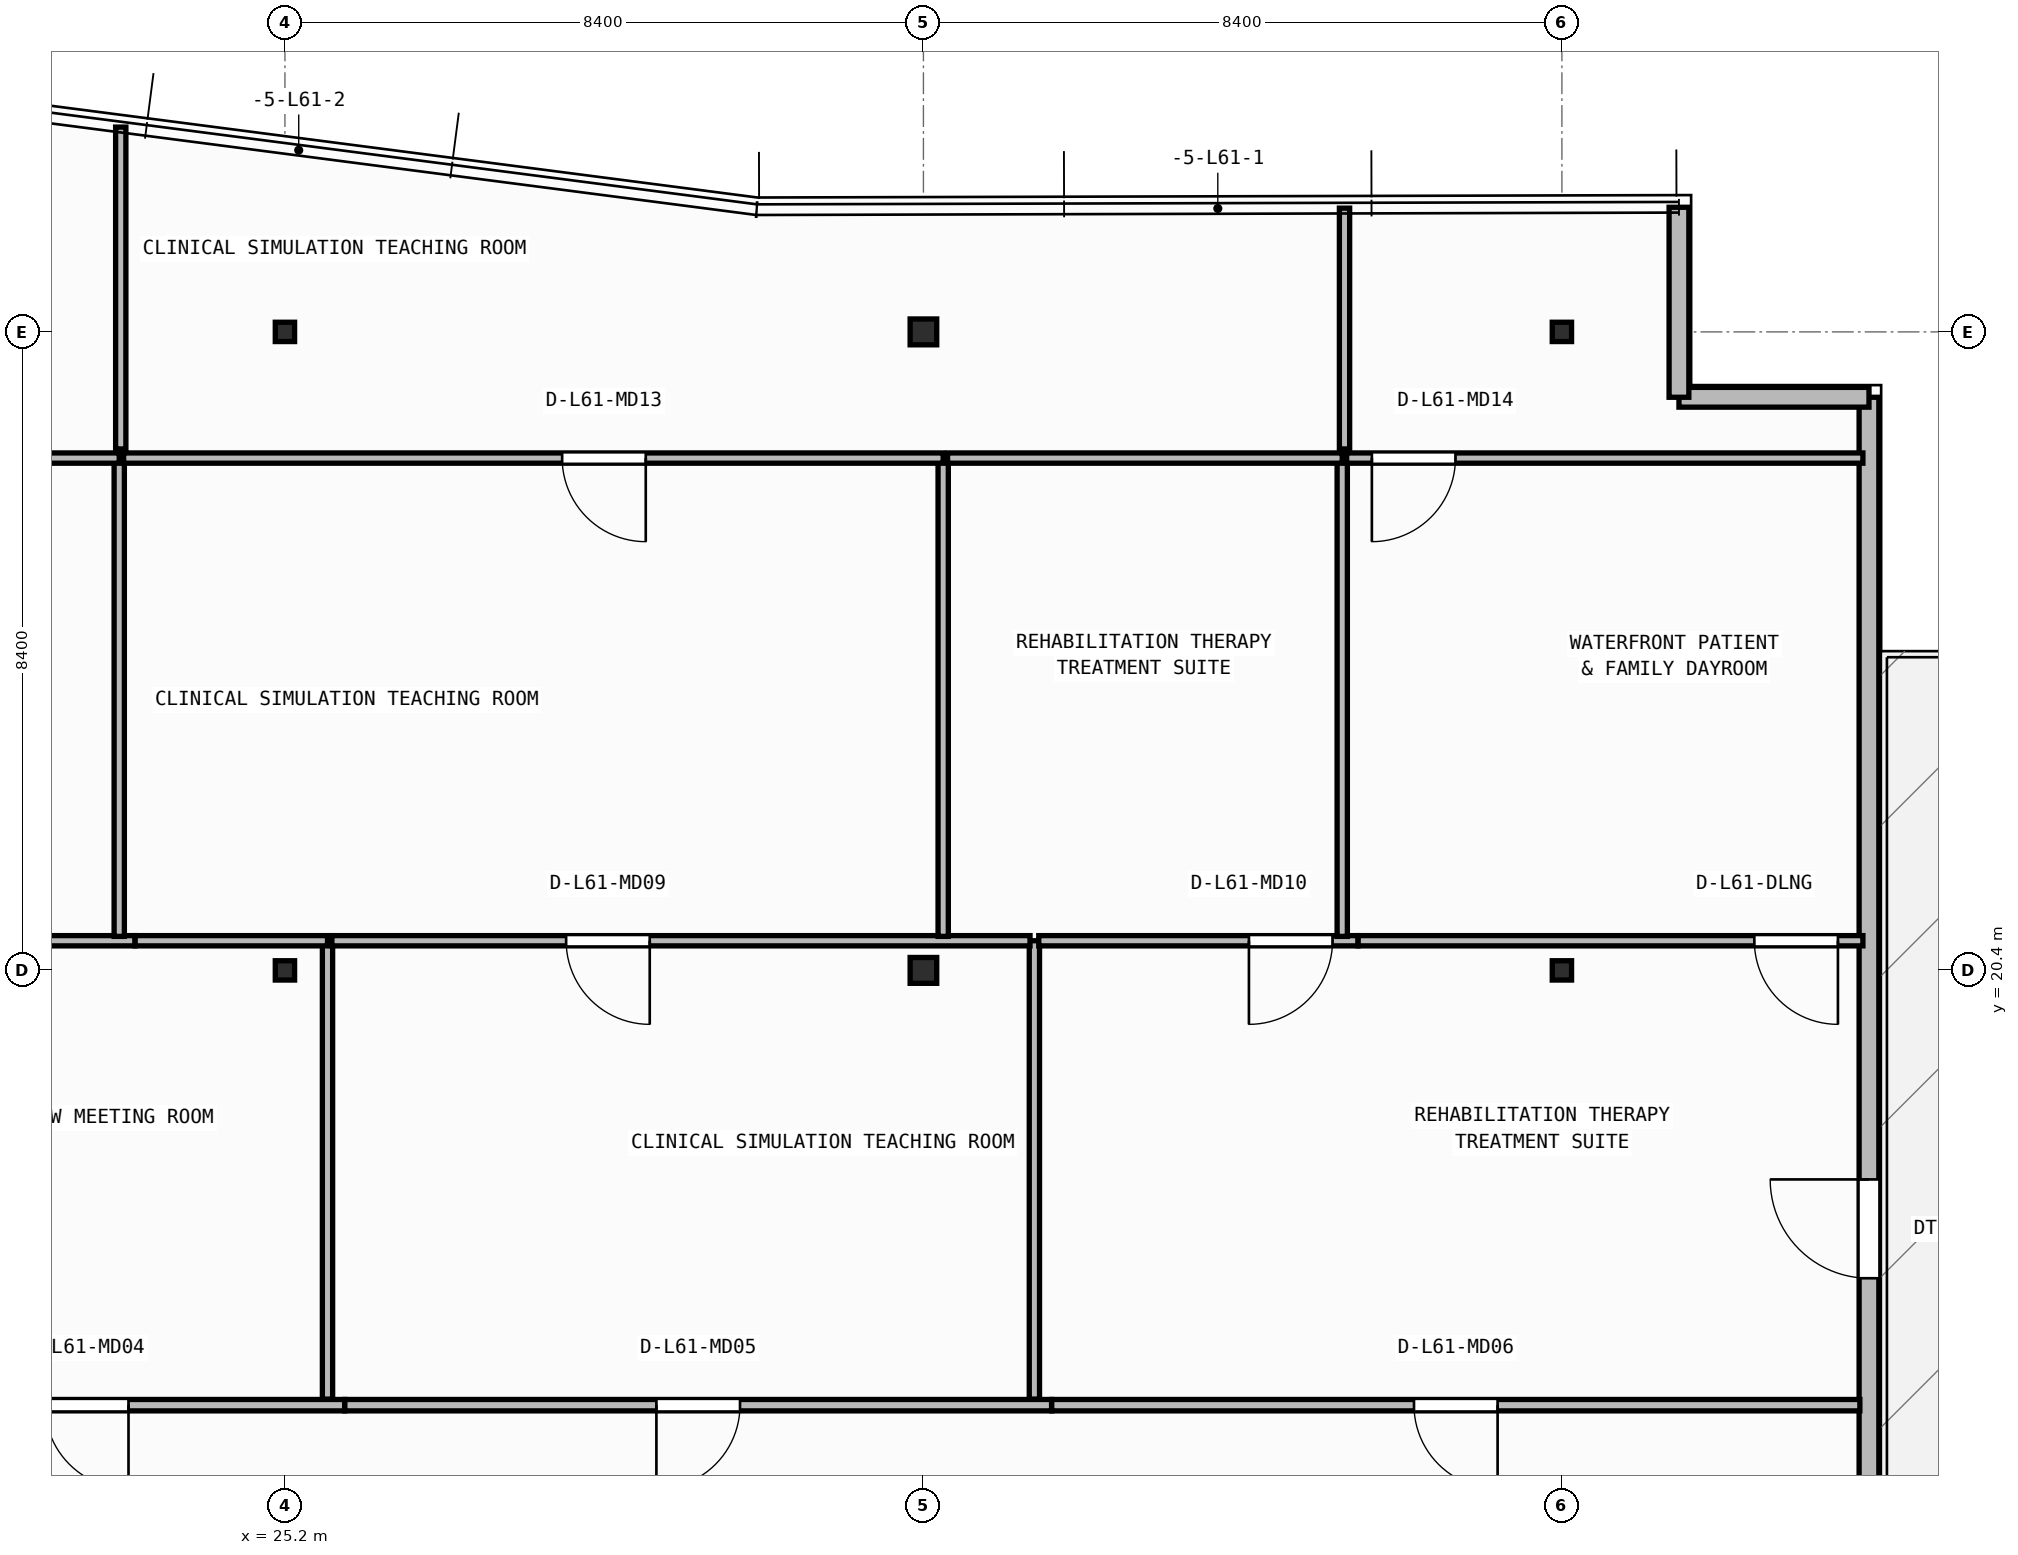
"""IFC4 building model, lengths in metres.
Left out: names, types, materials, properties, quantities, classifications, styles, units other than length and angle.
Written with IfcOpenShell. Run it as: python <this file> out.ifc"""

import sys

from ifc_helpers import new_model, si_unit, direction, frame, frame_2d, origin, origin_2d, place, context, subcontext, project, spatial, rectangle, i_section, extrude, element, fill, save


model = new_model("IFC4")
c1 = context("Model", 3, precision=1e-05, world=origin(), true_north=direction((0.0, 1.0)))
c2 = subcontext(c1, "Body", "Model", "MODEL_VIEW")
j1 = project(units=[si_unit("LENGTHUNIT", "METRE"), si_unit("PLANEANGLEUNIT", "RADIAN")], contexts=[c1])
p1 = place(None, origin())
s1 = spatial("IfcSite", under=j1, at=p1, CompositionType="ELEMENT")
p2 = place(p1, origin())
s2 = spatial("IfcBuilding", under=s1, at=p2, CompositionType="ELEMENT")
p3 = place(p2, frame((0.0, 0.0, 248.65)))
s3 = spatial("IfcBuildingStorey", under=s2, at=p3, CompositionType="ELEMENT", Elevation=248.65)
p4 = place(p3, frame((25.2, 20.4, 0.0), z_axis=(0.0, 0.0, 1.0), x_axis=(1.0, 0.0, 0.0)))
e1 = element("IfcColumn", 1, at=p4, inside=s3, PredefinedType="COLUMN", context=c2, shape_type="SweptSolid", body=[
    extrude(i_section(OverallWidth=0.254, OverallDepth=0.254, WebThickness=0.009, FlangeThickness=0.014, FilletRadius=0.013, at=origin_2d()), origin(), (0.0, 0.0, 1.0), 3.95),
])
p5 = place(p3, frame((33.6, 20.4, 0.0), z_axis=(0.0, 0.0, 1.0), x_axis=(1.0, 0.0, 0.0)))
e2 = element("IfcColumn", 2, at=p5, inside=s3, PredefinedType="COLUMN", context=c2, shape_type="SweptSolid", body=[
    extrude(i_section(OverallWidth=0.35, OverallDepth=0.34, WebThickness=0.016, FlangeThickness=0.028, at=origin_2d()), origin(), (0.0, 0.0, 1.0), 3.95),
])
for number, where, z_axis, x_axis in (
    (3, (42.0, 20.4, 0.0), (0.0, 0.0, 1.0), (1.0, 0.0, 0.0)),
    (4, (25.2, 28.8, 0.0), (0.0, 0.0, 1.0), (1.0, 0.0, 0.0)),
):
    element("IfcColumn", number, at=place(p3, frame(where, z_axis=z_axis, x_axis=x_axis)), inside=s3, PredefinedType="COLUMN", context=c2, shape_type="SweptSolid", body=[
        extrude(i_section(OverallWidth=0.254, OverallDepth=0.254, WebThickness=0.009, FlangeThickness=0.014, FilletRadius=0.013, at=origin_2d()), origin(), (0.0, 0.0, 1.0), 3.95),
    ])
p6 = place(p3, frame((33.6, 28.8, 0.0), z_axis=(0.0, 0.0, 1.0), x_axis=(1.0, 0.0, 0.0)))
e5 = element("IfcColumn", 5, at=p6, inside=s3, PredefinedType="COLUMN", context=c2, shape_type="SweptSolid", body=[
    extrude(i_section(OverallWidth=0.35, OverallDepth=0.34, WebThickness=0.016, FlangeThickness=0.028, at=origin_2d()), origin(), (0.0, 0.0, 1.0), 3.95),
])
p7 = place(p3, frame((42.0, 28.8, 0.0), z_axis=(0.0, 0.0, 1.0), x_axis=(1.0, 0.0, 0.0)))
e6 = element("IfcColumn", 6, at=p7, inside=s3, PredefinedType="COLUMN", context=c2, shape_type="SweptSolid", body=[
    extrude(i_section(OverallWidth=0.254, OverallDepth=0.254, WebThickness=0.009, FlangeThickness=0.014, FilletRadius=0.013, at=origin_2d()), origin(), (0.0, 0.0, 1.0), 3.95),
])
p8 = place(p3, frame((46.04, 6.06, 0.0), z_axis=(0.0, 0.0, 1.0), x_axis=(0.0, 1.0, 0.0)))
e7 = element("IfcWall", 7, at=p8, inside=s3, PredefinedType="STANDARD", context=c2, shape_type="SweptSolid", body=[
    extrude(rectangle(XDim=21.88, YDim=0.26, at=frame_2d((10.94, 0.0))), origin(), (0.0, 0.0, 1.0), 3.71),
])
p9 = place(p8, frame((10.29, 0.0, 0.0)))
e8 = element("IfcOpeningElement", 8, at=p9, cuts=e7, PredefinedType="OPENING", context=c2, shape_type="SweptSolid", body=[
    extrude(rectangle(XDim=1.3, YDim=2.15, at=frame_2d((0.65, 1.075))), frame((0.0, 0.14, 0.0), z_axis=(0.0, -1.0, 0.0), x_axis=(1.0, 0.0, 0.0)), (0.0, 0.0, 1.0), 0.28),
])
p10 = place(p3, frame((46.04, 27.94, 0.0), z_axis=(0.0, 0.0, 1.0), x_axis=(-1.0, 0.0, 0.0)))
e9 = element("IfcWall", 9, at=p10, inside=s3, PredefinedType="STANDARD", context=c2, shape_type="SweptSolid", body=[
    extrude(rectangle(XDim=2.5, YDim=0.26, at=frame_2d((1.25, 0.0))), origin(), (0.0, 0.0, 1.0), 3.71),
])
p11 = place(p3, frame((43.54, 27.94, 0.0), z_axis=(0.0, 0.0, 1.0), x_axis=(0.0, 1.0, 0.0)))
e10 = element("IfcWall", 10, at=p11, inside=s3, PredefinedType="STANDARD", context=c2, shape_type="SweptSolid", body=[
    extrude(rectangle(XDim=2.5, YDim=0.26, at=frame_2d((1.25, 0.0))), origin(), (0.0, 0.0, 1.0), 3.71),
])
p12 = place(p3, frame((25.986, 14.68, 0.0), z_axis=(0.0, 0.0, 1.0), x_axis=(-1.0, 0.0, 0.0)))
e11 = element("IfcWall", 11, at=p12, inside=s3, PredefinedType="PARTITIONING", context=c2, shape_type="SweptSolid", body=[
    extrude(rectangle(XDim=6.788, YDim=0.15, at=frame_2d((3.394, 0.0))), origin(), (0.0, 0.0, 1.0), 3.71),
])
p13 = place(p12, frame((2.844, 0.0, 0.0)))
e12 = element("IfcOpeningElement", 12, at=p13, cuts=e11, PredefinedType="OPENING", context=c2, shape_type="SweptSolid", body=[
    extrude(rectangle(XDim=1.1, YDim=2.1, at=frame_2d((0.55, 1.05))), frame((0.0, 0.085, 0.0), z_axis=(0.0, -1.0, 0.0), x_axis=(1.0, 0.0, 0.0)), (0.0, 0.0, 1.0), 0.17),
])
p14 = place(p3, frame((35.286, 14.68, 0.0), z_axis=(0.0, 0.0, 1.0), x_axis=(-1.0, 0.0, 0.0)))
e13 = element("IfcWall", 13, at=p14, inside=s3, PredefinedType="PARTITIONING", context=c2, shape_type="SweptSolid", body=[
    extrude(rectangle(XDim=9.298, YDim=0.15, at=frame_2d((4.649, 0.0))), origin(), (0.0, 0.0, 1.0), 3.71),
])
p15 = place(p14, frame((4.099, 0.0, 0.0)))
e14 = element("IfcOpeningElement", 14, at=p15, cuts=e13, PredefinedType="OPENING", context=c2, shape_type="SweptSolid", body=[
    extrude(rectangle(XDim=1.1, YDim=2.1, at=frame_2d((0.55, 1.05))), frame((0.0, 0.085, 0.0), z_axis=(0.0, -1.0, 0.0), x_axis=(1.0, 0.0, 0.0)), (0.0, 0.0, 1.0), 0.17),
])
p16 = place(p3, frame((45.92, 14.68, 0.0), z_axis=(0.0, 0.0, 1.0), x_axis=(-1.0, 0.0, 0.0)))
e15 = element("IfcWall", 15, at=p16, inside=s3, PredefinedType="PARTITIONING", context=c2, shape_type="SweptSolid", body=[
    extrude(rectangle(XDim=10.632, YDim=0.15, at=frame_2d((5.316, 0.0))), origin(), (0.0, 0.0, 1.0), 3.71),
])
p17 = place(p16, frame((4.766, 0.0, 0.0)))
e16 = element("IfcOpeningElement", 16, at=p17, cuts=e15, PredefinedType="OPENING", context=c2, shape_type="SweptSolid", body=[
    extrude(rectangle(XDim=1.1, YDim=2.1, at=frame_2d((0.55, 1.05))), frame((0.0, 0.085, 0.0), z_axis=(0.0, -1.0, 0.0), x_axis=(1.0, 0.0, 0.0)), (0.0, 0.0, 1.0), 0.17),
])
p18 = place(p3, frame((25.76, 14.76, 0.0), z_axis=(0.0, 0.0, 1.0), x_axis=(0.0, 1.0, 0.0)))
e17 = element("IfcWall", 17, at=p18, inside=s3, PredefinedType="PARTITIONING", context=c2, shape_type="SweptSolid", body=[
    extrude(rectangle(XDim=6.03, YDim=0.135, at=frame_2d((3.015, 0.0))), origin(), (0.0, 0.0, 1.0), 3.71),
])
p19 = place(p3, frame((23.228, 20.79, 0.0), z_axis=(0.0, 0.0, 1.0), x_axis=(-1.0, 0.0, 0.0)))
e18 = element("IfcWall", 18, at=p19, inside=s3, PredefinedType="PARTITIONING", context=c2, shape_type="SweptSolid", body=[
    extrude(rectangle(XDim=4.2, YDim=0.135, at=frame_2d((2.1, 0.0))), origin(), (0.0, 0.0, 1.0), 3.157),
])
p20 = place(p3, frame((25.76, 20.79, 0.0), z_axis=(0.0, 0.0, 1.0), x_axis=(-1.0, 0.0, 0.0)))
e19 = element("IfcWall", 19, at=p20, inside=s3, PredefinedType="PARTITIONING", context=c2, shape_type="SweptSolid", body=[
    extrude(rectangle(XDim=2.531, YDim=0.135, at=frame_2d((1.265, 0.0))), origin(), (0.0, 0.0, 1.0), 3.157),
])
p21 = place(p3, frame((35.06, 14.76, 0.0), z_axis=(0.0, 0.0, 1.0), x_axis=(0.0, 1.0, 0.0)))
e20 = element("IfcWall", 20, at=p21, inside=s3, PredefinedType="PARTITIONING", context=c2, shape_type="SweptSolid", body=[
    extrude(rectangle(XDim=6.03, YDim=0.135, at=frame_2d((3.015, 0.0))), origin(), (0.0, 0.0, 1.0), 3.71),
])
p22 = place(p3, frame((35.002, 20.79, 0.0), z_axis=(0.0, 0.0, 1.0), x_axis=(-1.0, 0.0, 0.0)))
e21 = element("IfcWall", 21, at=p22, inside=s3, PredefinedType="PARTITIONING", context=c2, shape_type="SweptSolid", body=[
    extrude(rectangle(XDim=9.185, YDim=0.135, at=frame_2d((4.593, 0.0))), origin(), (0.0, 0.0, 1.0), 3.157),
])
p23 = place(p22, frame((5.003, 0.0, 0.0)))
e22 = element("IfcOpeningElement", 22, at=p23, cuts=e21, PredefinedType="OPENING", context=c2, shape_type="SweptSolid", body=[
    extrude(rectangle(XDim=1.1, YDim=2.1, at=frame_2d((0.55, 1.05))), frame((0.0, 0.077, 0.0), z_axis=(0.0, -1.0, 0.0), x_axis=(1.0, 0.0, 0.0)), (0.0, 0.0, 1.0), 0.155),
])
p24 = place(p3, frame((39.317, 20.79, 0.0), z_axis=(0.0, 0.0, 1.0), x_axis=(-1.0, 0.0, 0.0)))
e23 = element("IfcWall", 23, at=p24, inside=s3, PredefinedType="PARTITIONING", context=c2, shape_type="SweptSolid", body=[
    extrude(rectangle(XDim=4.2, YDim=0.135, at=frame_2d((2.1, 0.0))), origin(), (0.0, 0.0, 1.0), 3.157),
])
p25 = place(p24, frame((0.335, 0.0, 0.0)))
e24 = element("IfcOpeningElement", 24, at=p25, cuts=e23, PredefinedType="OPENING", context=c2, shape_type="SweptSolid", body=[
    extrude(rectangle(XDim=1.1, YDim=2.1, at=frame_2d((0.55, 1.05))), frame((0.0, 0.077, 0.0), z_axis=(0.0, -1.0, 0.0), x_axis=(1.0, 0.0, 0.0)), (0.0, 0.0, 1.0), 0.155),
])
p26 = place(p3, frame((45.96, 20.79, 0.0), z_axis=(0.0, 0.0, 1.0), x_axis=(-1.0, 0.0, 0.0)))
e25 = element("IfcWall", 25, at=p26, inside=s3, PredefinedType="PARTITIONING", context=c2, shape_type="SweptSolid", body=[
    extrude(rectangle(XDim=6.64, YDim=0.135, at=frame_2d((3.32, 0.0))), origin(), (0.0, 0.0, 1.0), 3.157),
])
p27 = place(p26, frame((0.329, 0.0, 0.0)))
e26 = element("IfcOpeningElement", 26, at=p27, cuts=e25, PredefinedType="OPENING", context=c2, shape_type="SweptSolid", body=[
    extrude(rectangle(XDim=1.1, YDim=2.1, at=frame_2d((0.55, 1.05))), frame((0.0, 0.077, 0.0), z_axis=(0.0, -1.0, 0.0), x_axis=(1.0, 0.0, 0.0)), (0.0, 0.0, 1.0), 0.155),
])
p28 = place(p3, frame((23.02, 20.847, 0.0), z_axis=(0.0, 0.0, 1.0), x_axis=(0.0, 1.0, 0.0)))
e27 = element("IfcWall", 27, at=p28, inside=s3, PredefinedType="PARTITIONING", context=c2, shape_type="SweptSolid", body=[
    extrude(rectangle(XDim=6.292, YDim=0.135, at=frame_2d((3.146, 0.0))), origin(), (0.0, 0.0, 1.0), 3.71),
])
p29 = place(p3, frame((23.02, 27.14, 0.0), z_axis=(0.0, 0.0, 1.0), x_axis=(-1.0, 0.0, 0.0)))
e28 = element("IfcWall", 28, at=p29, inside=s3, PredefinedType="PARTITIONING", context=c2, shape_type="SweptSolid", body=[
    extrude(rectangle(XDim=9.24, YDim=0.135, at=frame_2d((4.62, 0.0))), origin(), (0.0, 0.0, 1.0), 3.71),
])
p30 = place(p3, frame((33.86, 20.847, 0.0), z_axis=(0.0, 0.0, 1.0), x_axis=(0.0, 1.0, 0.0)))
e29 = element("IfcWall", 29, at=p30, inside=s3, PredefinedType="PARTITIONING", context=c2, shape_type="SweptSolid", body=[
    extrude(rectangle(XDim=6.292, YDim=0.135, at=frame_2d((3.146, 0.0))), origin(), (0.0, 0.0, 1.0), 3.157),
])
p31 = place(p3, frame((33.86, 27.14, 0.0), z_axis=(0.0, 0.0, 1.0), x_axis=(-1.0, 0.0, 0.0)))
e30 = element("IfcWall", 30, at=p31, inside=s3, PredefinedType="PARTITIONING", context=c2, shape_type="SweptSolid", body=[
    extrude(rectangle(XDim=10.783, YDim=0.135, at=frame_2d((5.391, 0.0))), origin(), (0.0, 0.0, 1.0), 3.71),
])
p32 = place(p31, frame((3.913, 0.0, 0.0)))
e31 = element("IfcOpeningElement", 31, at=p32, cuts=e30, PredefinedType="OPENING", context=c2, shape_type="SweptSolid", body=[
    extrude(rectangle(XDim=1.1, YDim=2.1, at=frame_2d((0.55, 1.05))), frame((0.0, 0.077, 0.0), z_axis=(0.0, -1.0, 0.0), x_axis=(1.0, 0.0, 0.0)), (0.0, 0.0, 1.0), 0.155),
])
p33 = place(p3, frame((39.11, 20.847, 0.0), z_axis=(0.0, 0.0, 1.0), x_axis=(0.0, 1.0, 0.0)))
e32 = element("IfcWall", 32, at=p33, inside=s3, PredefinedType="PARTITIONING", context=c2, shape_type="SweptSolid", body=[
    extrude(rectangle(XDim=6.292, YDim=0.135, at=frame_2d((3.146, 0.0))), origin(), (0.0, 0.0, 1.0), 3.71),
])
p34 = place(p3, frame((39.11, 27.14, 0.0), z_axis=(0.0, 0.0, 1.0), x_axis=(-1.0, 0.0, 0.0)))
e33 = element("IfcWall", 33, at=p34, inside=s3, PredefinedType="PARTITIONING", context=c2, shape_type="SweptSolid", body=[
    extrude(rectangle(XDim=5.193, YDim=0.135, at=frame_2d((2.596, 0.0))), origin(), (0.0, 0.0, 1.0), 3.71),
])
p35 = place(p3, frame((45.96, 27.14, 0.0), z_axis=(0.0, 0.0, 1.0), x_axis=(-1.0, 0.0, 0.0)))
e34 = element("IfcWall", 34, at=p35, inside=s3, PredefinedType="PARTITIONING", context=c2, shape_type="SweptSolid", body=[
    extrude(rectangle(XDim=6.792, YDim=0.135, at=frame_2d((3.396, 0.0))), origin(), (0.0, 0.0, 1.0), 3.71),
])
p36 = place(p35, frame((5.36, 0.0, 0.0)))
e35 = element("IfcOpeningElement", 35, at=p36, cuts=e34, PredefinedType="OPENING", context=c2, shape_type="SweptSolid", body=[
    extrude(rectangle(XDim=1.1, YDim=2.1, at=frame_2d((0.55, 1.05))), frame((0.0, 0.077, 0.0), z_axis=(0.0, -1.0, 0.0), x_axis=(1.0, 0.0, 0.0)), (0.0, 0.0, 1.0), 0.155),
])
p37 = place(p3, frame((23.04, 27.26, 0.0), z_axis=(0.0, 0.0, 1.0), x_axis=(0.0, 1.0, 0.0)))
e36 = element("IfcWall", 36, at=p37, inside=s3, PredefinedType="PARTITIONING", context=c2, shape_type="SweptSolid", body=[
    extrude(rectangle(XDim=4.234, YDim=0.135, at=frame_2d((2.117, 0.0))), origin(), (0.0, 0.0, 1.0), 3.71),
])
p38 = place(p3, frame((39.14, 27.26, 0.0), z_axis=(0.0, 0.0, 1.0), x_axis=(0.0, 1.0, 0.0)))
e37 = element("IfcWall", 37, at=p38, inside=s3, PredefinedType="PARTITIONING", context=c2, shape_type="SweptSolid", body=[
    extrude(rectangle(XDim=3.168, YDim=0.135, at=frame_2d((1.584, 0.0))), origin(), (0.0, 0.0, 1.0), 3.71),
])
p39 = place(p9, origin())
e38 = element("IfcDoor", 38, at=p39, inside=s3, OperationType="SINGLE_SWING_RIGHT", PredefinedType="DOOR", context=c2, shape_type="SweptSolid", body=[
    extrude(rectangle(XDim=1.3, YDim=2.15, at=frame_2d((0.65, 1.075))), frame((0.0, 0.025, 0.0), z_axis=(0.0, -1.0, 0.0), x_axis=(1.0, 0.0, 0.0)), (0.0, 0.0, 1.0), 0.05),
])
fill(e8, e38)
p40 = place(p13, origin())
e39 = element("IfcDoor", 39, at=p40, inside=s3, OperationType="SINGLE_SWING_LEFT", PredefinedType="DOOR", context=c2, shape_type="SweptSolid", body=[
    extrude(rectangle(XDim=1.1, YDim=2.1, at=frame_2d((0.55, 1.05))), frame((0.0, 0.025, 0.0), z_axis=(0.0, -1.0, 0.0), x_axis=(1.0, 0.0, 0.0)), (0.0, 0.0, 1.0), 0.05),
])
fill(e12, e39)
p41 = place(p15, origin())
e40 = element("IfcDoor", 40, at=p41, inside=s3, OperationType="SINGLE_SWING_RIGHT", PredefinedType="DOOR", context=c2, shape_type="SweptSolid", body=[
    extrude(rectangle(XDim=1.1, YDim=2.1, at=frame_2d((0.55, 1.05))), frame((0.0, 0.025, 0.0), z_axis=(0.0, -1.0, 0.0), x_axis=(1.0, 0.0, 0.0)), (0.0, 0.0, 1.0), 0.05),
])
fill(e14, e40)
p42 = place(p17, origin())
e41 = element("IfcDoor", 41, at=p42, inside=s3, OperationType="SINGLE_SWING_LEFT", PredefinedType="DOOR", context=c2, shape_type="SweptSolid", body=[
    extrude(rectangle(XDim=1.1, YDim=2.1, at=frame_2d((0.55, 1.05))), frame((0.0, 0.025, 0.0), z_axis=(0.0, -1.0, 0.0), x_axis=(1.0, 0.0, 0.0)), (0.0, 0.0, 1.0), 0.05),
])
fill(e16, e41)
p43 = place(p23, origin())
e42 = element("IfcDoor", 42, at=p43, inside=s3, OperationType="SINGLE_SWING_LEFT", PredefinedType="DOOR", context=c2, shape_type="SweptSolid", body=[
    extrude(rectangle(XDim=1.1, YDim=2.1, at=frame_2d((0.55, 1.05))), frame((0.0, 0.025, 0.0), z_axis=(0.0, -1.0, 0.0), x_axis=(1.0, 0.0, 0.0)), (0.0, 0.0, 1.0), 0.05),
])
fill(e22, e42)
p44 = place(p25, origin())
e43 = element("IfcDoor", 43, at=p44, inside=s3, OperationType="SINGLE_SWING_RIGHT", PredefinedType="DOOR", context=c2, shape_type="SweptSolid", body=[
    extrude(rectangle(XDim=1.1, YDim=2.1, at=frame_2d((0.55, 1.05))), frame((0.0, 0.025, 0.0), z_axis=(0.0, -1.0, 0.0), x_axis=(1.0, 0.0, 0.0)), (0.0, 0.0, 1.0), 0.05),
])
fill(e24, e43)
p45 = place(p27, origin())
e44 = element("IfcDoor", 44, at=p45, inside=s3, OperationType="SINGLE_SWING_LEFT", PredefinedType="DOOR", context=c2, shape_type="SweptSolid", body=[
    extrude(rectangle(XDim=1.1, YDim=2.1, at=frame_2d((0.55, 1.05))), frame((0.0, 0.025, 0.0), z_axis=(0.0, -1.0, 0.0), x_axis=(1.0, 0.0, 0.0)), (0.0, 0.0, 1.0), 0.05),
])
fill(e26, e44)
p46 = place(p32, origin())
e45 = element("IfcDoor", 45, at=p46, inside=s3, OperationType="SINGLE_SWING_LEFT", PredefinedType="DOOR", context=c2, shape_type="SweptSolid", body=[
    extrude(rectangle(XDim=1.1, YDim=2.1, at=frame_2d((0.55, 1.05))), frame((0.0, 0.025, 0.0), z_axis=(0.0, -1.0, 0.0), x_axis=(1.0, 0.0, 0.0)), (0.0, 0.0, 1.0), 0.05),
])
fill(e31, e45)
p47 = place(p36, origin())
e46 = element("IfcDoor", 46, at=p47, inside=s3, OperationType="SINGLE_SWING_RIGHT", PredefinedType="DOOR", context=c2, shape_type="SweptSolid", body=[
    extrude(rectangle(XDim=1.1, YDim=2.1, at=frame_2d((0.55, 1.05))), frame((0.0, 0.025, 0.0), z_axis=(0.0, -1.0, 0.0), x_axis=(1.0, 0.0, 0.0)), (0.0, 0.0, 1.0), 0.05),
])
fill(e35, e46)
save(model, sys.argv[1])
